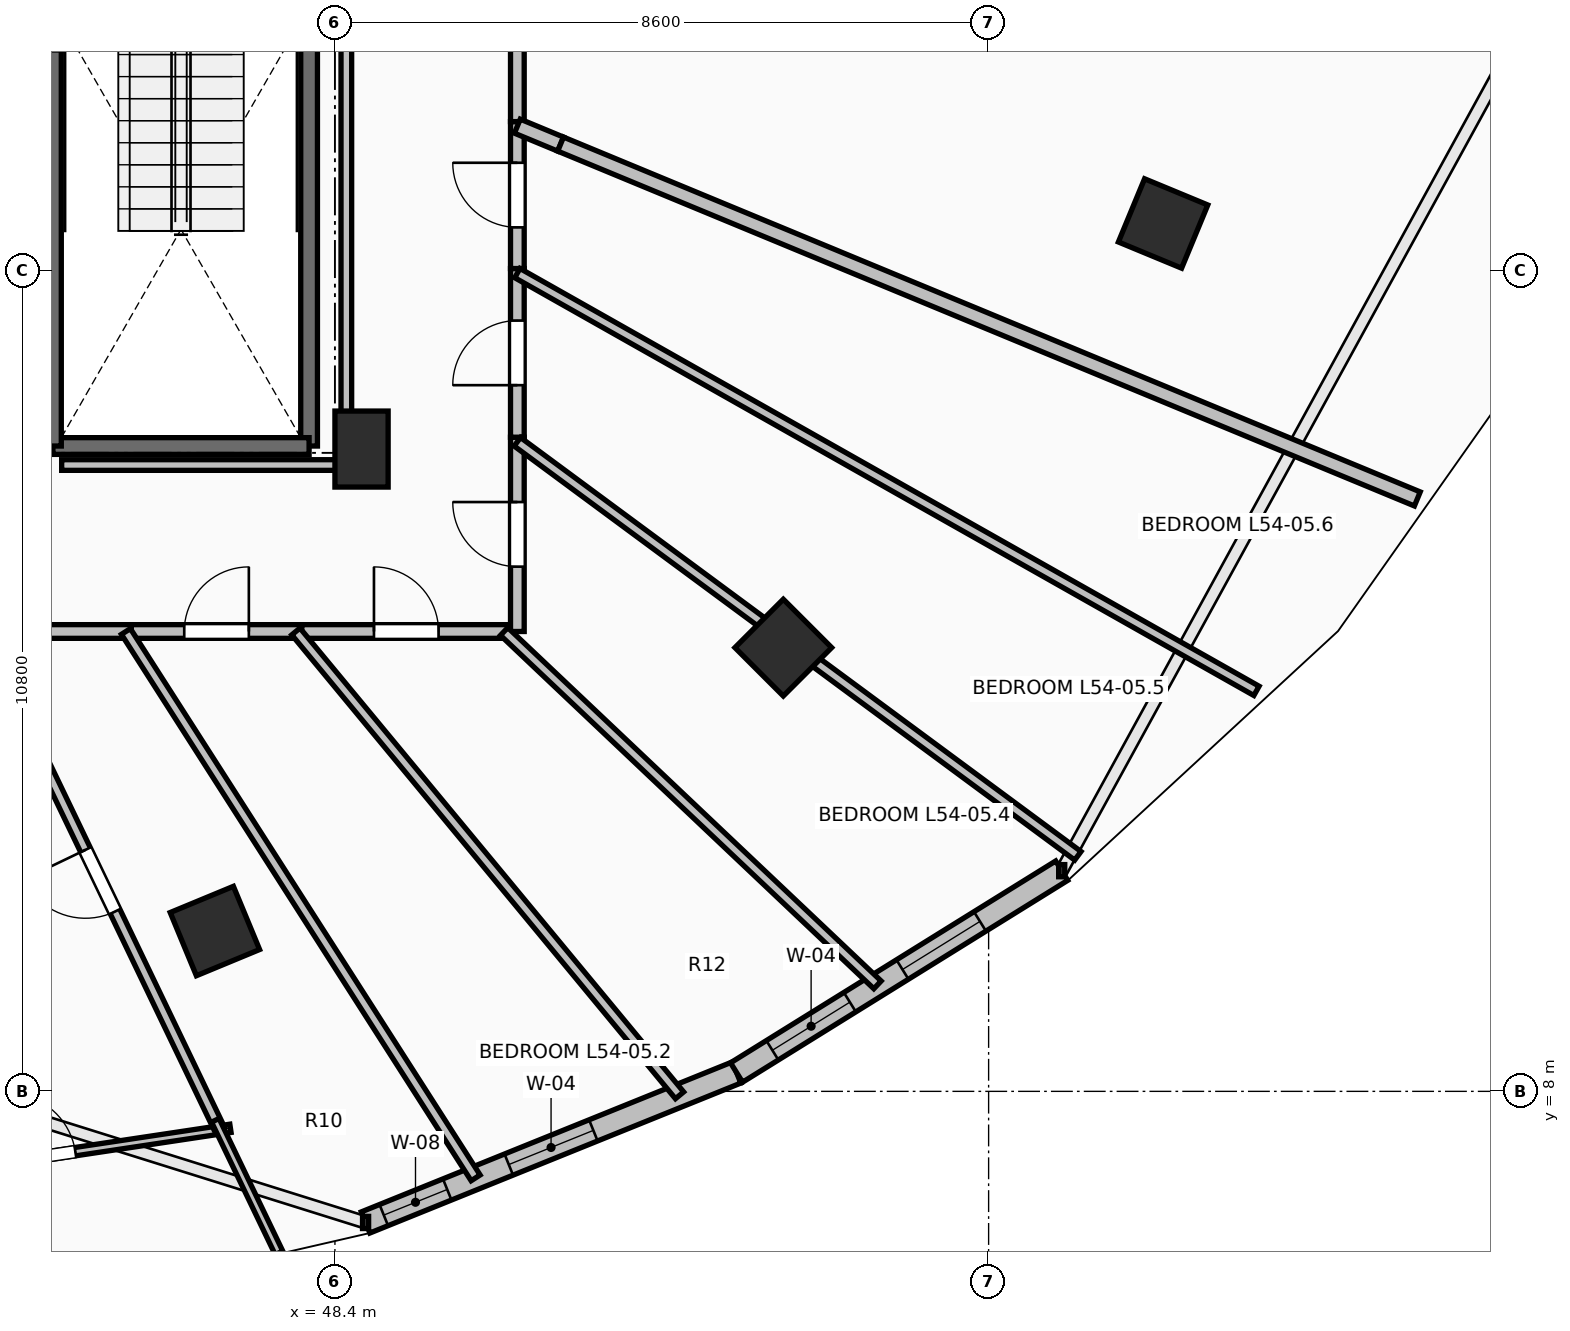
"""IFC4 building model, lengths in metres.
Left out: names, types, materials, properties, quantities, classifications, styles, units other than length and angle.
Written with IfcOpenShell. Run it as: python <this file> out.ifc"""

import sys

from ifc_helpers import new_model, si_unit, direction, frame, frame_2d, origin, origin_2d, place, context, subcontext, project, spatial, rectangle, extrude, element, fill, save


model = new_model("IFC4")
c1 = context("Model", 3, precision=1e-05, world=origin(), true_north=direction((0.0, 1.0)))
c2 = subcontext(c1, "Body", "Model", "MODEL_VIEW")
j1 = project(units=[si_unit("LENGTHUNIT", "METRE"), si_unit("PLANEANGLEUNIT", "RADIAN")], contexts=[c1])
p1 = place(None, origin())
s1 = spatial("IfcSite", under=j1, at=p1, CompositionType="ELEMENT")
p2 = place(p1, origin())
s2 = spatial("IfcBuilding", under=s1, at=p2, CompositionType="ELEMENT")
p3 = place(p2, frame((0.0, 0.0, 200.1)))
s3 = spatial("IfcBuildingStorey", under=s2, at=p3, CompositionType="ELEMENT", Elevation=200.1)
for number, where, z_axis, x_axis in (
    (1, (46.821, 10.109, 0.0), (0.0, 0.0, 1.0), (0.383, -0.924, 0.0)),
    (2, (54.299, 13.838, 0.0), (0.0, 0.0, 1.0), (0.707, -0.707, 0.0)),
    (3, (59.295, 19.418, 0.0), (0.0, 0.0, 1.0), (0.924, -0.383, 0.0)),
):
    element("IfcColumn", number, at=place(p3, frame(where, z_axis=z_axis, x_axis=x_axis)), inside=s3, PredefinedType="COLUMN", context=c2, shape_type="SweptSolid", body=[
        extrude(rectangle(XDim=0.9, YDim=0.9, at=origin_2d()), origin(), (0.0, 0.0, 1.0), 3.55),
    ])
p4 = place(p3, frame((48.75, 16.45, 0.0), z_axis=(0.0, 0.0, 1.0), x_axis=(1.0, 0.0, 0.0)))
e4 = element("IfcColumn", 4, at=p4, inside=s3, PredefinedType="PILASTER", context=c2, shape_type="SweptSolid", body=[
    extrude(rectangle(XDim=0.7, YDim=1.0, at=origin_2d()), origin(), (0.0, 0.0, 1.0), 3.55),
])
p5 = place(p3, frame((48.803, 6.275, 0.0), z_axis=(0.0, 0.0, 1.0), x_axis=(0.927111094334, 0.374786630981, 0.0)))
e5 = element("IfcWall", 5, at=p5, inside=s3, PredefinedType="STANDARD", context=c2, shape_type="SweptSolid", body=[
    extrude(rectangle(XDim=5.264, YDim=0.3, at=frame_2d((2.632, 0.0))), origin(), (0.0, 0.0, 1.0), 3.29),
])
p6 = place(p5, frame((0.258, 0.0, 0.85)))
e6 = element("IfcOpeningElement", 6, at=p6, cuts=e5, PredefinedType="OPENING", context=c2, shape_type="SweptSolid", body=[
    extrude(rectangle(XDim=0.9, YDim=1.8, at=frame_2d((0.45, 0.9))), frame((0.0, 0.165, 0.0), z_axis=(0.0, -1.0, 0.0), x_axis=(1.0, 0.0, 0.0)), (0.0, 0.0, 1.0), 0.33),
])
p7 = place(p5, frame((2.032, 0.0, 0.85)))
e7 = element("IfcOpeningElement", 7, at=p7, cuts=e5, PredefinedType="OPENING", context=c2, shape_type="SweptSolid", body=[
    extrude(rectangle(XDim=1.2, YDim=1.95, at=frame_2d((0.6, 0.975))), frame((0.0, 0.165, 0.0), z_axis=(0.0, -1.0, 0.0), x_axis=(1.0, 0.0, 0.0)), (0.0, 0.0, 1.0), 0.33),
])
p8 = place(p3, frame((53.684, 8.248, 0.0), z_axis=(0.0, 0.0, 1.0), x_axis=(0.849647657754, 0.527350791858, 0.0)))
e8 = element("IfcWall", 8, at=p8, inside=s3, PredefinedType="STANDARD", context=c2, shape_type="SweptSolid", body=[
    extrude(rectangle(XDim=5.035, YDim=0.3, at=frame_2d((2.518, 0.0))), origin(), (0.0, 0.0, 1.0), 3.29),
])
p9 = place(p8, frame((0.555, 0.0, 0.85)))
e9 = element("IfcOpeningElement", 9, at=p9, cuts=e8, PredefinedType="OPENING", context=c2, shape_type="SweptSolid", body=[
    extrude(rectangle(XDim=1.2, YDim=1.95, at=frame_2d((0.6, 0.975))), frame((0.0, 0.165, 0.0), z_axis=(0.0, -1.0, 0.0), x_axis=(1.0, 0.0, 0.0)), (0.0, 0.0, 1.0), 0.33),
])
p10 = place(p8, frame((2.569, 0.0, 0.85)))
e10 = element("IfcOpeningElement", 10, at=p10, cuts=e8, PredefinedType="OPENING", context=c2, shape_type="SweptSolid", body=[
    extrude(rectangle(XDim=1.2, YDim=1.95, at=frame_2d((0.6, 0.975))), frame((0.0, 0.165, 0.0), z_axis=(0.0, -1.0, 0.0), x_axis=(1.0, 0.0, 0.0)), (0.0, 0.0, 1.0), 0.33),
])
p11 = place(p3, frame((48.06, 23.91, 0.0), z_axis=(0.0, 0.0, 1.0), x_axis=(0.0, -1.0, 0.0)))
e11 = element("IfcWall", 11, at=p11, inside=s3, PredefinedType="SOLIDWALL", context=c2, shape_type="SweptSolid", body=[
    extrude(rectangle(XDim=7.42, YDim=0.22, at=frame_2d((3.71, 0.0))), origin(), (0.0, 0.0, 1.0), 3.29),
])
p12 = place(p3, frame((48.06, 16.49, 0.0), z_axis=(0.0, 0.0, 1.0), x_axis=(-1.0, 0.0, 0.0)))
e12 = element("IfcWall", 12, at=p12, inside=s3, PredefinedType="SOLIDWALL", context=c2, shape_type="SweptSolid", body=[
    extrude(rectangle(XDim=3.37, YDim=0.22, at=frame_2d((1.685, 0.0))), origin(), (0.0, 0.0, 1.0), 3.29),
])
p13 = place(p3, frame((44.69, 16.49, 0.0), z_axis=(0.0, 0.0, 1.0), x_axis=(0.0, 1.0, 0.0)))
e13 = element("IfcWall", 13, at=p13, inside=s3, PredefinedType="SOLIDWALL", context=c2, shape_type="SweptSolid", body=[
    extrude(rectangle(XDim=7.42, YDim=0.22, at=frame_2d((3.71, 0.0))), origin(), (0.0, 0.0, 1.0), 3.29),
])
p14 = place(p3, frame((43.805, 14.05, 0.0), z_axis=(0.0, 0.0, 1.0), x_axis=(1.0, 0.0, 0.0)))
e14 = element("IfcWall", 14, at=p14, inside=s3, PredefinedType="PARTITIONING", context=c2, shape_type="SweptSolid", body=[
    extrude(rectangle(XDim=1.916, YDim=0.18, at=frame_2d((0.958, 0.0))), origin(), (0.0, 0.0, 1.0), 2.482),
])
p15 = place(p3, frame((45.721, 14.05, 0.0), z_axis=(0.0, 0.0, 1.0), x_axis=(1.0, 0.0, 0.0)))
e15 = element("IfcWall", 15, at=p15, inside=s3, PredefinedType="PARTITIONING", context=c2, shape_type="SweptSolid", body=[
    extrude(rectangle(XDim=2.243, YDim=0.18, at=frame_2d((1.122, 0.0))), origin(), (0.0, 0.0, 1.0), 2.482),
])
p16 = place(p15, frame((0.697, 0.0, 0.0)))
e16 = element("IfcOpeningElement", 16, at=p16, cuts=e15, PredefinedType="OPENING", context=c2, shape_type="SweptSolid", body=[
    extrude(rectangle(XDim=0.85, YDim=2.1, at=frame_2d((0.425, 1.05))), frame((0.0, 0.105, 0.0), z_axis=(0.0, -1.0, 0.0), x_axis=(1.0, 0.0, 0.0)), (0.0, 0.0, 1.0), 0.21),
])
p17 = place(p3, frame((47.964, 14.05, 0.0), z_axis=(0.0, 0.0, 1.0), x_axis=(1.0, 0.0, 0.0)))
e17 = element("IfcWall", 17, at=p17, inside=s3, PredefinedType="PARTITIONING", context=c2, shape_type="SweptSolid", body=[
    extrude(rectangle(XDim=2.749, YDim=0.18, at=frame_2d((1.375, 0.0))), origin(), (0.0, 0.0, 1.0), 2.482),
])
p18 = place(p17, frame((0.949, 0.0, 0.0)))
e18 = element("IfcOpeningElement", 18, at=p18, cuts=e17, PredefinedType="OPENING", context=c2, shape_type="SweptSolid", body=[
    extrude(rectangle(XDim=0.85, YDim=2.1, at=frame_2d((0.425, 1.05))), frame((0.0, 0.105, 0.0), z_axis=(0.0, -1.0, 0.0), x_axis=(1.0, 0.0, 0.0)), (0.0, 0.0, 1.0), 0.21),
])
p19 = place(p3, frame((50.8, 14.05, 0.0), z_axis=(0.0, 0.0, 1.0), x_axis=(0.0, 1.0, 0.0)))
e19 = element("IfcWall", 19, at=p19, inside=s3, PredefinedType="PARTITIONING", context=c2, shape_type="SweptSolid", body=[
    extrude(rectangle(XDim=2.556, YDim=0.18, at=frame_2d((1.278, 0.0))), origin(), (0.0, 0.0, 1.0), 2.482),
])
p20 = place(p19, frame((0.853, 0.0, 0.0)))
e20 = element("IfcOpeningElement", 20, at=p20, cuts=e19, PredefinedType="OPENING", context=c2, shape_type="SweptSolid", body=[
    extrude(rectangle(XDim=0.85, YDim=2.1, at=frame_2d((0.425, 1.05))), frame((0.0, 0.105, 0.0), z_axis=(0.0, -1.0, 0.0), x_axis=(1.0, 0.0, 0.0)), (0.0, 0.0, 1.0), 0.21),
])
p21 = place(p3, frame((50.8, 16.606, 0.0), z_axis=(0.0, 0.0, 1.0), x_axis=(0.0, 1.0, 0.0)))
e21 = element("IfcWall", 21, at=p21, inside=s3, PredefinedType="PARTITIONING", context=c2, shape_type="SweptSolid", body=[
    extrude(rectangle(XDim=2.219, YDim=0.18, at=frame_2d((1.109, 0.0))), origin(), (0.0, 0.0, 1.0), 2.936),
])
p22 = place(p21, frame((0.685, 0.0, 0.0)))
e22 = element("IfcOpeningElement", 22, at=p22, cuts=e21, PredefinedType="OPENING", context=c2, shape_type="SweptSolid", body=[
    extrude(rectangle(XDim=0.85, YDim=2.1, at=frame_2d((0.425, 1.05))), frame((0.0, 0.105, 0.0), z_axis=(0.0, -1.0, 0.0), x_axis=(1.0, 0.0, 0.0)), (0.0, 0.0, 1.0), 0.21),
])
p23 = place(p3, frame((50.8, 18.825, 0.0), z_axis=(0.0, 0.0, 1.0), x_axis=(0.0, 1.0, 0.0)))
e23 = element("IfcWall", 23, at=p23, inside=s3, PredefinedType="PARTITIONING", context=c2, shape_type="SweptSolid", body=[
    extrude(rectangle(XDim=1.933, YDim=0.18, at=frame_2d((0.967, 0.0))), origin(), (0.0, 0.0, 1.0), 3.29),
])
p24 = place(p23, frame((0.542, 0.0, 0.0)))
e24 = element("IfcOpeningElement", 24, at=p24, cuts=e23, PredefinedType="OPENING", context=c2, shape_type="SweptSolid", body=[
    extrude(rectangle(XDim=0.85, YDim=2.1, at=frame_2d((0.425, 1.05))), frame((0.0, 0.105, 0.0), z_axis=(0.0, -1.0, 0.0), x_axis=(1.0, 0.0, 0.0)), (0.0, 0.0, 1.0), 0.21),
])
p25 = place(p3, frame((50.8, 20.758, 0.0), z_axis=(0.0, 0.0, 1.0), x_axis=(0.0, 1.0, 0.0)))
e25 = element("IfcWall", 25, at=p25, inside=s3, PredefinedType="PARTITIONING", context=c2, shape_type="SweptSolid", body=[
    extrude(rectangle(XDim=3.792, YDim=0.18, at=frame_2d((1.896, 0.0))), origin(), (0.0, 0.0, 1.0), 3.29),
])
p26 = place(p3, frame((42.055, 6.766, 0.0), z_axis=(0.0, 0.0, 1.0), x_axis=(0.988872134662, 0.148767944424, 0.0)))
e26 = element("IfcWall", 26, at=p26, inside=s3, PredefinedType="PARTITIONING", context=c2, shape_type="SweptSolid", body=[
    extrude(rectangle(XDim=5.027, YDim=0.11, at=frame_2d((2.513, 0.0))), origin(), (0.0, 0.0, 1.0), 3.29),
])
p27 = place(p26, frame((2.063, 0.0, 0.0)))
e27 = element("IfcOpeningElement", 27, at=p27, cuts=e26, PredefinedType="OPENING", context=c2, shape_type="SweptSolid", body=[
    extrude(rectangle(XDim=0.9, YDim=2.1, at=frame_2d((0.45, 1.05))), frame((0.0, 0.07, 0.0), z_axis=(0.0, -1.0, 0.0), x_axis=(1.0, 0.0, 0.0)), (0.0, 0.0, 1.0), 0.14),
])
p28 = place(p3, frame((46.887, 7.493, 0.0), z_axis=(0.0, 0.0, 1.0), x_axis=(-0.43289909466, 0.901442385204, 0.0)))
e28 = element("IfcWall", 28, at=p28, inside=s3, PredefinedType="PARTITIONING", context=c2, shape_type="SweptSolid", body=[
    extrude(rectangle(XDim=7.274, YDim=0.14, at=frame_2d((3.637, 0.0))), origin(), (0.0, 0.0, 1.0), 2.482),
])
p29 = place(p28, frame((3.187, 0.0, 0.0)))
e29 = element("IfcOpeningElement", 29, at=p29, cuts=e28, PredefinedType="OPENING", context=c2, shape_type="SweptSolid", body=[
    extrude(rectangle(XDim=0.9, YDim=2.1, at=frame_2d((0.45, 1.05))), frame((0.0, 0.085, 0.0), z_axis=(0.0, -1.0, 0.0), x_axis=(1.0, 0.0, 0.0)), (0.0, 0.0, 1.0), 0.17),
])
p30 = place(p3, frame((47.664, 5.876, 0.0), z_axis=(0.0, 0.0, 1.0), x_axis=(-0.432866492457, 0.901458041014, 0.0)))
e30 = element("IfcWall", 30, at=p30, inside=s3, PredefinedType="PARTITIONING", context=c2, shape_type="SweptSolid", body=[
    extrude(rectangle(XDim=1.934, YDim=0.11, at=frame_2d((0.967, 0.0))), origin(), (0.0, 0.0, 1.0), 3.29),
])
p31 = place(p3, frame((50.251, 6.862, 0.0), z_axis=(0.0, 0.0, 1.0), x_axis=(-0.539117012224, 0.842230875194, 0.0)))
e31 = element("IfcWall", 31, at=p31, inside=s3, PredefinedType="PARTITIONING", context=c2, shape_type="SweptSolid", body=[
    extrude(rectangle(XDim=8.534, YDim=0.14, at=frame_2d((4.267, 0.0))), origin(), (0.0, 0.0, 1.0), 2.482),
])
p32 = place(p3, frame((52.934, 7.948, 0.0), z_axis=(0.0, 0.0, 1.0), x_axis=(-0.637427009283, 0.77051074479, 0.0)))
e32 = element("IfcWall", 32, at=p32, inside=s3, PredefinedType="PARTITIONING", context=c2, shape_type="SweptSolid", body=[
    extrude(rectangle(XDim=7.919, YDim=0.14, at=frame_2d((3.96, 0.0))), origin(), (0.0, 0.0, 1.0), 2.482),
])
p33 = place(p3, frame((55.538, 9.401, 0.0), z_axis=(0.0, 0.0, 1.0), x_axis=(-0.726277952769, 0.687401145854, 0.0)))
e33 = element("IfcWall", 33, at=p33, inside=s3, PredefinedType="PARTITIONING", context=c2, shape_type="SweptSolid", body=[
    extrude(rectangle(XDim=6.763, YDim=0.14, at=frame_2d((3.382, 0.0))), origin(), (0.0, 0.0, 1.0), 2.824),
])
p34 = place(p3, frame((58.174, 11.099, 0.0), z_axis=(0.0, 0.0, 1.0), x_axis=(-0.804363169868, 0.594137939338, 0.0)))
e34 = element("IfcWall", 34, at=p34, inside=s3, PredefinedType="PARTITIONING", context=c2, shape_type="SweptSolid", body=[
    extrude(rectangle(XDim=9.167, YDim=0.14, at=frame_2d((4.584, 0.0))), origin(), (0.0, 0.0, 1.0), 2.482),
])
p35 = place(p3, frame((60.524, 13.269, 0.0), z_axis=(0.0, 0.0, 1.0), x_axis=(-0.870572608778, 0.49203997078, 0.0)))
e35 = element("IfcWall", 35, at=p35, inside=s3, PredefinedType="PARTITIONING", context=c2, shape_type="SweptSolid", body=[
    extrude(rectangle(XDim=11.169, YDim=0.14, at=frame_2d((5.585, 0.0))), origin(), (0.0, 0.0, 1.0), 2.824),
])
p36 = place(p3, frame((51.369, 20.462, 0.0), z_axis=(0.0, 0.0, 1.0), x_axis=(-0.923615496363, 0.383320251066, 0.0)))
e36 = element("IfcWall", 36, at=p36, inside=s3, PredefinedType="PARTITIONING", context=c2, shape_type="SweptSolid", body=[
    extrude(rectangle(XDim=0.616, YDim=0.2, at=frame_2d((0.308, 0.0))), origin(), (0.0, 0.0, 1.0), 2.936),
])
p37 = place(p3, frame((62.64, 15.794, 0.0), z_axis=(0.0, 0.0, 1.0), x_axis=(-0.923897809723, 0.382639304291, 0.0)))
e37 = element("IfcWall", 37, at=p37, inside=s3, PredefinedType="PARTITIONING", context=c2, shape_type="SweptSolid", body=[
    extrude(rectangle(XDim=12.199, YDim=0.2, at=frame_2d((6.1, 0.0))), origin(), (0.0, 0.0, 1.0), 2.824),
])
p38 = place(p3, frame((48.55, 16.24, 0.0), z_axis=(0.0, 0.0, 1.0), x_axis=(0.0, 1.0, 0.0)))
e38 = element("IfcWall", 38, at=p38, inside=s3, PredefinedType="PARTITIONING", context=c2, shape_type="SweptSolid", body=[
    extrude(rectangle(XDim=7.514, YDim=0.14, at=frame_2d((3.757, 0.0))), origin(), (0.0, 0.0, 1.0), 2.482),
])
p39 = place(p3, frame((44.805, 16.24, 0.0), z_axis=(0.0, 0.0, 1.0), x_axis=(1.0, 0.0, 0.0)))
e39 = element("IfcWall", 39, at=p39, inside=s3, PredefinedType="PARTITIONING", context=c2, shape_type="SweptSolid", body=[
    extrude(rectangle(XDim=3.745, YDim=0.14, at=frame_2d((1.873, 0.0))), origin(), (0.0, 0.0, 1.0), 2.482),
])
p40 = place(p6, origin())
e40 = element("IfcWindow", 40, at=p40, inside=s3, PartitioningType="SINGLE_PANEL", PredefinedType="WINDOW", context=c2, shape_type="SweptSolid", body=[
    extrude(rectangle(XDim=0.9, YDim=1.8, at=frame_2d((0.45, 0.9))), frame((0.0, 0.03, 0.0), z_axis=(0.0, -1.0, 0.0), x_axis=(1.0, 0.0, 0.0)), (0.0, 0.0, 1.0), 0.06),
])
fill(e6, e40)
p41 = place(p7, origin())
e41 = element("IfcWindow", 41, at=p41, inside=s3, PartitioningType="SINGLE_PANEL", PredefinedType="WINDOW", context=c2, shape_type="SweptSolid", body=[
    extrude(rectangle(XDim=1.2, YDim=1.95, at=frame_2d((0.6, 0.975))), frame((0.0, 0.03, 0.0), z_axis=(0.0, -1.0, 0.0), x_axis=(1.0, 0.0, 0.0)), (0.0, 0.0, 1.0), 0.06),
])
fill(e7, e41)
p42 = place(p9, origin())
e42 = element("IfcWindow", 42, at=p42, inside=s3, PartitioningType="SINGLE_PANEL", PredefinedType="WINDOW", context=c2, shape_type="SweptSolid", body=[
    extrude(rectangle(XDim=1.2, YDim=1.95, at=frame_2d((0.6, 0.975))), frame((0.0, 0.03, 0.0), z_axis=(0.0, -1.0, 0.0), x_axis=(1.0, 0.0, 0.0)), (0.0, 0.0, 1.0), 0.06),
])
fill(e9, e42)
p43 = place(p10, origin())
e43 = element("IfcWindow", 43, at=p43, inside=s3, PartitioningType="SINGLE_PANEL", PredefinedType="WINDOW", context=c2, shape_type="SweptSolid", body=[
    extrude(rectangle(XDim=1.2, YDim=1.95, at=frame_2d((0.6, 0.975))), frame((0.0, 0.03, 0.0), z_axis=(0.0, -1.0, 0.0), x_axis=(1.0, 0.0, 0.0)), (0.0, 0.0, 1.0), 0.06),
])
fill(e10, e43)
p44 = place(p27, origin())
e44 = element("IfcDoor", 44, at=p44, inside=s3, OperationType="SINGLE_SWING_LEFT", PredefinedType="DOOR", context=c2, shape_type="SweptSolid", body=[
    extrude(rectangle(XDim=0.9, YDim=2.1, at=frame_2d((0.45, 1.05))), frame((0.0, 0.025, 0.0), z_axis=(0.0, -1.0, 0.0), x_axis=(1.0, 0.0, 0.0)), (0.0, 0.0, 1.0), 0.05),
])
fill(e27, e44)
p45 = place(p29, origin())
e45 = element("IfcDoor", 45, at=p45, inside=s3, OperationType="SINGLE_SWING_RIGHT", PredefinedType="DOOR", context=c2, shape_type="SweptSolid", body=[
    extrude(rectangle(XDim=0.9, YDim=2.1, at=frame_2d((0.45, 1.05))), frame((0.0, 0.025, 0.0), z_axis=(0.0, -1.0, 0.0), x_axis=(1.0, 0.0, 0.0)), (0.0, 0.0, 1.0), 0.05),
])
fill(e29, e45)
p46 = place(p16, origin())
e46 = element("IfcDoor", 46, at=p46, inside=s3, OperationType="SINGLE_SWING_RIGHT", PredefinedType="DOOR", context=c2, shape_type="SweptSolid", body=[
    extrude(rectangle(XDim=0.85, YDim=2.1, at=frame_2d((0.425, 1.05))), frame((0.0, 0.025, 0.0), z_axis=(0.0, -1.0, 0.0), x_axis=(1.0, 0.0, 0.0)), (0.0, 0.0, 1.0), 0.05),
])
fill(e16, e46)
p47 = place(p18, origin())
e47 = element("IfcDoor", 47, at=p47, inside=s3, OperationType="SINGLE_SWING_LEFT", PredefinedType="DOOR", context=c2, shape_type="SweptSolid", body=[
    extrude(rectangle(XDim=0.85, YDim=2.1, at=frame_2d((0.425, 1.05))), frame((0.0, 0.025, 0.0), z_axis=(0.0, -1.0, 0.0), x_axis=(1.0, 0.0, 0.0)), (0.0, 0.0, 1.0), 0.05),
])
fill(e18, e47)
p48 = place(p20, origin())
e48 = element("IfcDoor", 48, at=p48, inside=s3, OperationType="SINGLE_SWING_RIGHT", PredefinedType="DOOR", context=c2, shape_type="SweptSolid", body=[
    extrude(rectangle(XDim=0.85, YDim=2.1, at=frame_2d((0.425, 1.05))), frame((0.0, 0.025, 0.0), z_axis=(0.0, -1.0, 0.0), x_axis=(1.0, 0.0, 0.0)), (0.0, 0.0, 1.0), 0.05),
])
fill(e20, e48)
p49 = place(p22, origin())
e49 = element("IfcDoor", 49, at=p49, inside=s3, OperationType="SINGLE_SWING_LEFT", PredefinedType="DOOR", context=c2, shape_type="SweptSolid", body=[
    extrude(rectangle(XDim=0.85, YDim=2.1, at=frame_2d((0.425, 1.05))), frame((0.0, 0.025, 0.0), z_axis=(0.0, -1.0, 0.0), x_axis=(1.0, 0.0, 0.0)), (0.0, 0.0, 1.0), 0.05),
])
fill(e22, e49)
p50 = place(p24, origin())
e50 = element("IfcDoor", 50, at=p50, inside=s3, OperationType="SINGLE_SWING_RIGHT", PredefinedType="DOOR", context=c2, shape_type="SweptSolid", body=[
    extrude(rectangle(XDim=0.85, YDim=2.1, at=frame_2d((0.425, 1.05))), frame((0.0, 0.025, 0.0), z_axis=(0.0, -1.0, 0.0), x_axis=(1.0, 0.0, 0.0)), (0.0, 0.0, 1.0), 0.05),
])
fill(e24, e50)
save(model, sys.argv[1])
